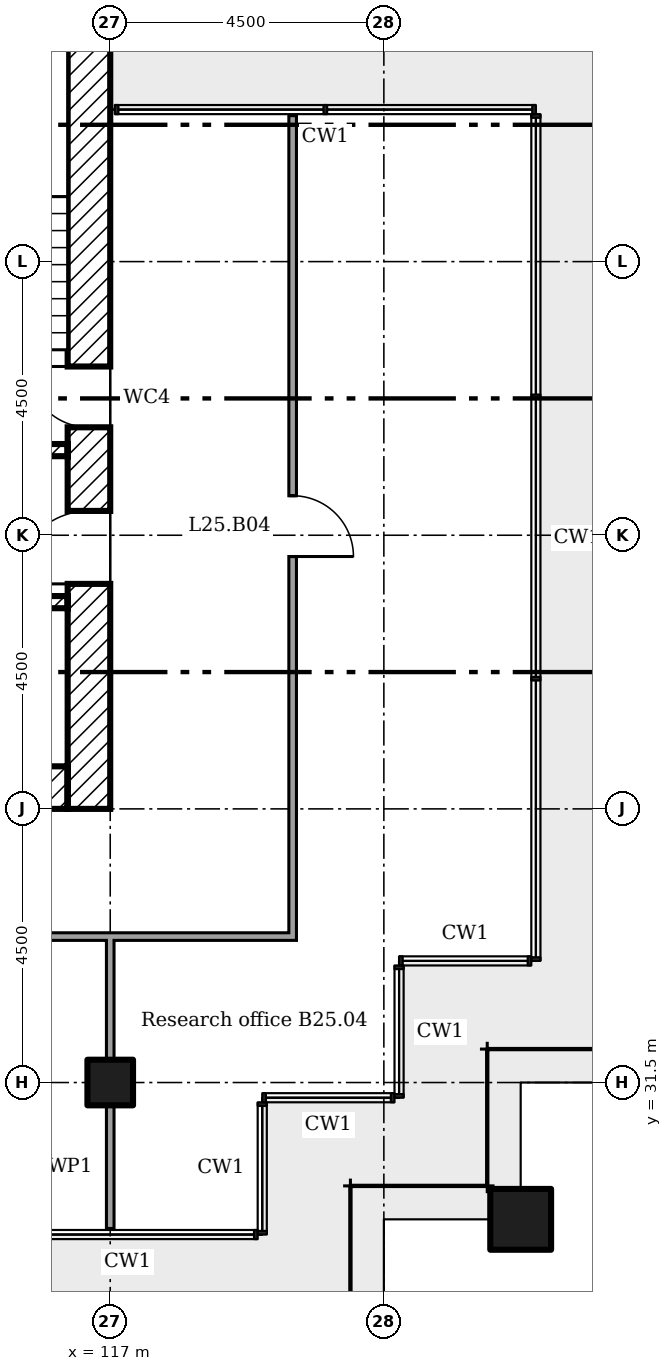
"""IFC4 building model, lengths in metres.
Left out: names, types, materials, properties, quantities, classifications, styles, units other than length and angle.
Written with IfcOpenShell. Run it as: python <this file> out.ifc"""

import sys

from ifc_helpers import new_model, si_unit, direction, frame, frame_2d, origin, origin_2d, place, context, subcontext, project, spatial, rectangle, extrude, element, fill, save


model = new_model("IFC4")
c1 = context("Model", 3, precision=1e-05, world=origin(), true_north=direction((0.0, 1.0)))
c2 = subcontext(c1, "Body", "Model", "MODEL_VIEW")
j1 = project(units=[si_unit("LENGTHUNIT", "METRE"), si_unit("PLANEANGLEUNIT", "RADIAN")], contexts=[c1])
p1 = place(None, origin())
s1 = spatial("IfcSite", under=j1, at=p1, CompositionType="ELEMENT")
p2 = place(p1, origin())
s2 = spatial("IfcBuilding", under=s1, at=p2, CompositionType="ELEMENT")
p3 = place(p2, frame((0.0, 0.0, 102.8)))
s3 = spatial("IfcBuildingStorey", under=s2, at=p3, CompositionType="ELEMENT", Elevation=102.8)
p4 = place(p3, frame((123.75, 29.25, 0.0)))
e1 = element("IfcColumn", 1, at=p4, inside=s3, PredefinedType="COLUMN", context=c2, shape_type="SweptSolid", body=[
    extrude(rectangle(XDim=1.0, YDim=1.0, at=origin_2d()), origin(), (0.0, 0.0, 1.0), 3.6),
])
p5 = place(p3, frame((117.0, 31.5, 0.0)))
e2 = element("IfcColumn", 2, at=p5, inside=s3, PredefinedType="COLUMN", context=c2, shape_type="SweptSolid", body=[
    extrude(rectangle(XDim=0.75, YDim=0.75, at=origin_2d()), origin(), (0.0, 0.0, 1.0), 3.6),
])
p6 = place(p3, frame((116.65, 36.0, 0.0), z_axis=(0.0, 0.0, 1.0), x_axis=(0.0, 1.0, 0.0)))
e3 = element("IfcWall", 3, at=p6, inside=s3, PredefinedType="SHEAR", context=c2, shape_type="SweptSolid", body=[
    extrude(rectangle(XDim=13.5, YDim=0.7, at=frame_2d((6.75, 0.0))), origin(), (0.0, 0.0, 1.0), 3.35),
])
p7 = place(p6, frame((3.7, 0.0, 0.0)))
e4 = element("IfcOpeningElement", 4, at=p7, cuts=e3, PredefinedType="OPENING", context=c2, shape_type="SweptSolid", body=[
    extrude(rectangle(XDim=1.2, YDim=2.1, at=frame_2d((0.6, 1.05))), frame((0.0, 0.36, 0.0), z_axis=(0.0, -1.0, 0.0), x_axis=(1.0, 0.0, 0.0)), (0.0, 0.0, 1.0), 0.72),
])
p8 = place(p6, frame((6.275, 0.0, 0.0)))
e5 = element("IfcOpeningElement", 5, at=p8, cuts=e3, PredefinedType="OPENING", context=c2, shape_type="SweptSolid", body=[
    extrude(rectangle(XDim=1.0, YDim=2.1, at=frame_2d((0.5, 1.05))), frame((0.0, 0.36, 0.0), z_axis=(0.0, -1.0, 0.0), x_axis=(1.0, 0.0, 0.0)), (0.0, 0.0, 1.0), 0.72),
])
p9 = place(p3, frame((104.2, 36.35, 0.0)))
e6 = element("IfcWall", 6, at=p9, inside=s3, PredefinedType="SHEAR", context=c2, shape_type="SweptSolid", body=[
    extrude(rectangle(XDim=12.1, YDim=0.7, at=frame_2d((6.05, 0.0))), origin(), (0.0, 0.0, 1.0), 3.35),
])
p10 = place(p3, frame((107.2, 39.4, 0.0)))
e7 = element("IfcWall", 7, at=p10, inside=s3, PredefinedType="SHEAR", context=c2, shape_type="SweptSolid", body=[
    extrude(rectangle(XDim=9.1, YDim=0.2, at=frame_2d((4.55, 0.0))), origin(), (0.0, 0.0, 1.0), 3.35),
])
p11 = place(p10, frame((0.867, 0.0, 0.0)))
e8 = element("IfcOpeningElement", 8, at=p11, cuts=e7, PredefinedType="OPENING", context=c2, shape_type="SweptSolid", body=[
    extrude(rectangle(XDim=1.2, YDim=2.1, at=frame_2d((0.6, 1.05))), frame((0.0, 0.11, 0.0), z_axis=(0.0, -1.0, 0.0), x_axis=(1.0, 0.0, 0.0)), (0.0, 0.0, 1.0), 0.22),
])
p12 = place(p10, frame((3.8, 0.0, 0.0)))
e9 = element("IfcOpeningElement", 9, at=p12, cuts=e7, PredefinedType="OPENING", context=c2, shape_type="SweptSolid", body=[
    extrude(rectangle(XDim=1.2, YDim=2.1, at=frame_2d((0.6, 1.05))), frame((0.0, 0.11, 0.0), z_axis=(0.0, -1.0, 0.0), x_axis=(1.0, 0.0, 0.0)), (0.0, 0.0, 1.0), 0.22),
])
p13 = place(p10, frame((6.733, 0.0, 0.0)))
e10 = element("IfcOpeningElement", 10, at=p13, cuts=e7, PredefinedType="OPENING", context=c2, shape_type="SweptSolid", body=[
    extrude(rectangle(XDim=1.2, YDim=2.1, at=frame_2d((0.6, 1.05))), frame((0.0, 0.11, 0.0), z_axis=(0.0, -1.0, 0.0), x_axis=(1.0, 0.0, 0.0)), (0.0, 0.0, 1.0), 0.22),
])
p14 = place(p3, frame((113.5, 41.9, 0.0)))
e11 = element("IfcWall", 11, at=p14, inside=s3, PredefinedType="SHEAR", context=c2, shape_type="SweptSolid", body=[
    extrude(rectangle(XDim=2.8, YDim=0.2, at=frame_2d((1.4, 0.0))), origin(), (0.0, 0.0, 1.0), 3.35),
])
p15 = place(p14, frame((0.75, 0.0, 0.0)))
e12 = element("IfcOpeningElement", 12, at=p15, cuts=e11, PredefinedType="OPENING", context=c2, shape_type="SweptSolid", body=[
    extrude(rectangle(XDim=1.0, YDim=2.1, at=frame_2d((0.5, 1.05))), frame((0.0, 0.11, 0.0), z_axis=(0.0, -1.0, 0.0), x_axis=(1.0, 0.0, 0.0)), (0.0, 0.0, 1.0), 0.22),
])
p16 = place(p3, frame((99.837, 33.9, 0.0)))
e13 = element("IfcWall", 13, at=p16, inside=s3, PredefinedType="PARTITIONING", context=c2, shape_type="SweptSolid", body=[
    extrude(rectangle(XDim=20.225, YDim=0.125, at=frame_2d((10.113, 0.0))), origin(), (0.0, 0.0, 1.0), 3.45),
])
p17 = place(p16, frame((1.47, 0.0, 0.0)))
e14 = element("IfcOpeningElement", 14, at=p17, cuts=e13, PredefinedType="OPENING", context=c2, shape_type="SweptSolid", body=[
    extrude(rectangle(XDim=1.0, YDim=2.1, at=frame_2d((0.5, 1.05))), frame((0.0, 0.073, 0.0), z_axis=(0.0, -1.0, 0.0), x_axis=(1.0, 0.0, 0.0)), (0.0, 0.0, 1.0), 0.145),
])
p18 = place(p16, frame((11.942, 0.0, 0.0)))
e15 = element("IfcOpeningElement", 15, at=p18, cuts=e13, PredefinedType="OPENING", context=c2, shape_type="SweptSolid", body=[
    extrude(rectangle(XDim=1.0, YDim=2.1, at=frame_2d((0.5, 1.05))), frame((0.0, 0.073, 0.0), z_axis=(0.0, -1.0, 0.0), x_axis=(1.0, 0.0, 0.0)), (0.0, 0.0, 1.0), 0.145),
])
for number, where, z_axis, x_axis in (
    (16, (117.0, 29.1, 0.0), (0.0, 0.0, 1.0), (0.0, 1.0, 0.0)),
    (17, (117.0, 31.875, 0.0), (0.0, 0.0, 1.0), (0.0, 1.0, 0.0)),
):
    element("IfcWall", number, at=place(p3, frame(where, z_axis=z_axis, x_axis=x_axis)), inside=s3, PredefinedType="PARTITIONING", context=c2, shape_type="SweptSolid", body=[
        extrude(rectangle(XDim=2.025, YDim=0.125, at=frame_2d((1.012, 0.0))), origin(), (0.0, 0.0, 1.0), 2.842),
    ])
p19 = place(p3, frame((120.0, 33.962, 0.0), z_axis=(0.0, 0.0, 1.0), x_axis=(0.0, 1.0, 0.0)))
e18 = element("IfcWall", 18, at=p19, inside=s3, PredefinedType="PARTITIONING", context=c2, shape_type="SweptSolid", body=[
    extrude(rectangle(XDim=13.438, YDim=0.125, at=frame_2d((6.719, 0.0))), origin(), (0.0, 0.0, 1.0), 3.45),
])
p20 = place(p19, frame((6.188, 0.0, 0.0)))
e19 = element("IfcOpeningElement", 19, at=p20, cuts=e18, PredefinedType="OPENING", context=c2, shape_type="SweptSolid", body=[
    extrude(rectangle(XDim=1.0, YDim=2.1, at=frame_2d((0.5, 1.05))), frame((0.0, 0.073, 0.0), z_axis=(0.0, -1.0, 0.0), x_axis=(1.0, 0.0, 0.0)), (0.0, 0.0, 1.0), 0.145),
])
p21 = place(p7, origin())
e20 = element("IfcDoor", 20, at=p21, inside=s3, OperationType="SINGLE_SWING_RIGHT", PredefinedType="DOOR", context=c2, shape_type="SweptSolid", body=[
    extrude(rectangle(XDim=1.2, YDim=2.1, at=frame_2d((0.6, 1.05))), frame((0.0, 0.025, 0.0), z_axis=(0.0, -1.0, 0.0), x_axis=(1.0, 0.0, 0.0)), (0.0, 0.0, 1.0), 0.05),
])
fill(e4, e20)
p22 = place(p8, origin())
e21 = element("IfcDoor", 21, at=p22, inside=s3, OperationType="SINGLE_SWING_LEFT", PredefinedType="DOOR", context=c2, shape_type="SweptSolid", body=[
    extrude(rectangle(XDim=1.0, YDim=2.1, at=frame_2d((0.5, 1.05))), frame((0.0, 0.025, 0.0), z_axis=(0.0, -1.0, 0.0), x_axis=(1.0, 0.0, 0.0)), (0.0, 0.0, 1.0), 0.05),
])
fill(e5, e21)
p23 = place(p20, frame((1.0, 0.0, 0.0), x_axis=(-1.0, 0.0, 0.0)))
e22 = element("IfcDoor", 22, at=p23, inside=s3, OperationType="SINGLE_SWING_LEFT", PredefinedType="DOOR", context=c2, shape_type="SweptSolid", body=[
    extrude(rectangle(XDim=1.0, YDim=2.1, at=frame_2d((0.5, 1.05))), frame((0.0, 0.025, 0.0), z_axis=(0.0, -1.0, 0.0), x_axis=(1.0, 0.0, 0.0)), (0.0, 0.0, 1.0), 0.05),
])
fill(e19, e22)
save(model, sys.argv[1])
